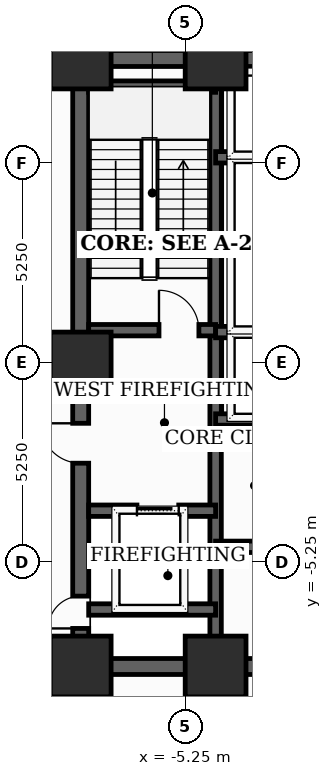
"""IFC4 building model, lengths in metres.
Left out: names, types, materials, properties, quantities, classifications, styles, units other than length and angle.
Written with IfcOpenShell. Run it as: python <this file> out.ifc"""

import sys

from ifc_helpers import new_model, si_unit, direction, frame, frame_2d, origin, origin_2d, place, context, subcontext, project, spatial, rectangle, extrude, element, fill, save


model = new_model("IFC4")
c1 = context("Model", 3, precision=1e-05, world=origin(), true_north=direction((0.0, 1.0)))
c2 = subcontext(c1, "Body", "Model", "MODEL_VIEW")
j1 = project(units=[si_unit("LENGTHUNIT", "METRE"), si_unit("PLANEANGLEUNIT", "RADIAN")], contexts=[c1])
p1 = place(None, origin())
s1 = spatial("IfcSite", under=j1, at=p1, CompositionType="ELEMENT")
p2 = place(p1, origin())
s2 = spatial("IfcBuilding", under=s1, at=p2, CompositionType="ELEMENT")
p3 = place(p2, frame((0.0, 0.0, 20.8)))
s3 = spatial("IfcBuildingStorey", under=s2, at=p3, CompositionType="ELEMENT", Elevation=20.8)
for number, where, z_axis, x_axis in (
    (1, (-8.0, -8.0, 0.0), (0.0, 0.0, 1.0), (1.0, 0.0, 0.0)),
    (2, (-4.45, -8.0, 0.0), (0.0, 0.0, 1.0), (1.0, 0.0, 0.0)),
    (3, (-4.45, 8.0, 0.0), (0.0, 0.0, 1.0), (1.0, 0.0, 0.0)),
    (4, (-8.0, 8.0, 0.0), (0.0, 0.0, 1.0), (1.0, 0.0, 0.0)),
    (5, (-8.0, 0.0, 0.0), (0.0, 0.0, 1.0), (1.0, 0.0, 0.0)),
):
    element("IfcColumn", number, at=place(p3, frame(where, z_axis=z_axis, x_axis=x_axis)), inside=s3, PredefinedType="COLUMN", context=c2, shape_type="SweptSolid", body=[
        extrude(rectangle(XDim=1.6, YDim=1.6, at=origin_2d()), origin(), (0.0, 0.0, 1.0), 5.2),
    ])
p4 = place(p3, frame((-8.0, -8.0, 0.0), z_axis=(0.0, 0.0, 1.0), x_axis=(0.0, 1.0, 0.0)))
e6 = element("IfcWall", 6, at=p4, inside=s3, PredefinedType="SHEAR", context=c2, shape_type="SweptSolid", body=[
    extrude(rectangle(XDim=16.0, YDim=0.42, at=frame_2d((8.0, 0.0))), origin(), (0.0, 0.0, 1.0), 4.94),
])
p5 = place(p4, frame((1.002, 0.0, 0.0)))
e7 = element("IfcOpeningElement", 7, at=p5, cuts=e6, PredefinedType="OPENING", context=c2, shape_type="SweptSolid", body=[
    extrude(rectangle(XDim=0.85, YDim=2.02, at=frame_2d((0.425, 1.01))), frame((0.0, 0.22, 0.0), z_axis=(0.0, -1.0, 0.0), x_axis=(1.0, 0.0, 0.0)), (0.0, 0.0, 1.0), 0.44),
])
p6 = place(p4, frame((5.35, 0.0, 0.0)))
e8 = element("IfcOpeningElement", 8, at=p6, cuts=e6, PredefinedType="OPENING", context=c2, shape_type="SweptSolid", body=[
    extrude(rectangle(XDim=1.05, YDim=2.15, at=frame_2d((0.525, 1.075))), frame((0.0, 0.22, 0.0), z_axis=(0.0, -1.0, 0.0), x_axis=(1.0, 0.0, 0.0)), (0.0, 0.0, 1.0), 0.44),
])
p7 = place(p3, frame((-8.0, -8.0, 0.0), z_axis=(0.0, 0.0, 1.0), x_axis=(1.0, 0.0, 0.0)))
e9 = element("IfcWall", 9, at=p7, inside=s3, PredefinedType="SHEAR", context=c2, shape_type="SweptSolid", body=[
    extrude(rectangle(XDim=16.0, YDim=0.42, at=frame_2d((8.0, 0.0))), origin(), (0.0, 0.0, 1.0), 4.94),
])
p8 = place(p7, frame((7.52, 0.0, 0.0)))
e10 = element("IfcOpeningElement", 10, at=p8, cuts=e9, PredefinedType="OPENING", context=c2, shape_type="SweptSolid", body=[
    extrude(rectangle(XDim=0.95, YDim=2.1, at=frame_2d((0.475, 1.05))), frame((0.0, 0.22, 0.0), z_axis=(0.0, -1.0, 0.0), x_axis=(1.0, 0.0, 0.0)), (0.0, 0.0, 1.0), 0.44),
])
p9 = place(p3, frame((-8.0, 8.0, 0.0), z_axis=(0.0, 0.0, 1.0), x_axis=(1.0, 0.0, 0.0)))
e11 = element("IfcWall", 11, at=p9, inside=s3, PredefinedType="SHEAR", context=c2, shape_type="SweptSolid", body=[
    extrude(rectangle(XDim=16.0, YDim=0.42, at=frame_2d((8.0, 0.0))), origin(), (0.0, 0.0, 1.0), 4.94),
])
p10 = place(p9, frame((7.1, 0.0, 0.0)))
e12 = element("IfcOpeningElement", 12, at=p10, cuts=e11, PredefinedType="OPENING", context=c2, shape_type="SweptSolid", body=[
    extrude(rectangle(XDim=1.8, YDim=2.15, at=frame_2d((0.9, 1.075))), frame((0.0, 0.22, 0.0), z_axis=(0.0, -1.0, 0.0), x_axis=(1.0, 0.0, 0.0)), (0.0, 0.0, 1.0), 0.44),
])
p11 = place(p3, frame((-4.45, -7.79, 0.0), z_axis=(0.0, 0.0, 1.0), x_axis=(0.0, 1.0, 0.0)))
e13 = element("IfcWall", 13, at=p11, inside=s3, PredefinedType="SHEAR", context=c2, shape_type="SweptSolid", body=[
    extrude(rectangle(XDim=15.58, YDim=0.3, at=frame_2d((7.79, 0.0))), origin(), (0.0, 0.0, 1.0), 4.94),
])
p12 = place(p3, frame((-7.79, 0.85, 0.0), z_axis=(0.0, 0.0, 1.0), x_axis=(1.0, 0.0, 0.0)))
e14 = element("IfcWall", 14, at=p12, inside=s3, PredefinedType="SHEAR", context=c2, shape_type="SweptSolid", body=[
    extrude(rectangle(XDim=3.34, YDim=0.3, at=frame_2d((1.67, 0.0))), origin(), (0.0, 0.0, 1.0), 4.94),
])
p13 = place(p12, frame((1.85, 0.0, 0.0)))
e15 = element("IfcOpeningElement", 15, at=p13, cuts=e14, PredefinedType="OPENING", context=c2, shape_type="SweptSolid", body=[
    extrude(rectangle(XDim=1.05, YDim=2.15, at=frame_2d((0.525, 1.075))), frame((0.0, 0.16, 0.0), z_axis=(0.0, -1.0, 0.0), x_axis=(1.0, 0.0, 0.0)), (0.0, 0.0, 1.0), 0.32),
])
p14 = place(p3, frame((-7.79, 7.26, 0.0), z_axis=(0.0, 0.0, 1.0), x_axis=(1.0, 0.0, 0.0)))
e16 = element("IfcWall", 16, at=p14, inside=s3, PredefinedType="SHEAR", context=c2, shape_type="SweptSolid", body=[
    extrude(rectangle(XDim=3.34, YDim=0.3, at=frame_2d((1.67, 0.0))), origin(), (0.0, 0.0, 1.0), 4.94),
])
p15 = place(p3, frame((-7.79, -3.9, 0.0), z_axis=(0.0, 0.0, 1.0), x_axis=(1.0, 0.0, 0.0)))
e17 = element("IfcWall", 17, at=p15, inside=s3, PredefinedType="SHEAR", context=c2, shape_type="SweptSolid", body=[
    extrude(rectangle(XDim=3.34, YDim=0.3, at=frame_2d((1.67, 0.0))), origin(), (0.0, 0.0, 1.0), 4.94),
])
p16 = place(p15, frame((1.27, 0.0, 0.0)))
e18 = element("IfcOpeningElement", 18, at=p16, cuts=e17, PredefinedType="OPENING", context=c2, shape_type="SweptSolid", body=[
    extrude(rectangle(XDim=1.1, YDim=2.1, at=frame_2d((0.55, 1.05))), frame((0.0, 0.16, 0.0), z_axis=(0.0, -1.0, 0.0), x_axis=(1.0, 0.0, 0.0)), (0.0, 0.0, 1.0), 0.32),
])
p17 = place(p3, frame((-7.79, -6.5, 0.0), z_axis=(0.0, 0.0, 1.0), x_axis=(1.0, 0.0, 0.0)))
e19 = element("IfcWall", 19, at=p17, inside=s3, PredefinedType="SHEAR", context=c2, shape_type="SweptSolid", body=[
    extrude(rectangle(XDim=3.34, YDim=0.3, at=frame_2d((1.67, 0.0))), origin(), (0.0, 0.0, 1.0), 4.94),
])
p18 = place(p3, frame((-4.45, -4.85, 0.0), z_axis=(0.0, 0.0, 1.0), x_axis=(1.0, 0.0, 0.0)))
e20 = element("IfcWall", 20, at=p18, inside=s3, PredefinedType="SHEAR", context=c2, shape_type="SweptSolid", body=[
    extrude(rectangle(XDim=8.9, YDim=0.3, at=frame_2d((4.45, 0.0))), origin(), (0.0, 0.0, 1.0), 4.94),
])
for number, where, z_axis, x_axis in (
    (21, (-4.45, -1.5, 0.0), (0.0, 0.0, 1.0), (1.0, 0.0, 0.0)),
    (22, (-4.45, 0.8, 0.0), (0.0, 0.0, 1.0), (1.0, 0.0, 0.0)),
    (23, (-4.45, 3.1, 0.0), (0.0, 0.0, 1.0), (1.0, 0.0, 0.0)),
    (24, (-4.45, 5.4, 0.0), (0.0, 0.0, 1.0), (1.0, 0.0, 0.0)),
):
    element("IfcWall", number, at=place(p3, frame(where, z_axis=z_axis, x_axis=x_axis)), inside=s3, PredefinedType="SHEAR", context=c2, shape_type="SweptSolid", body=[
        extrude(rectangle(XDim=2.77, YDim=0.3, at=frame_2d((1.385, 0.0))), origin(), (0.0, 0.0, 1.0), 4.94),
    ])
p19 = place(p5, origin())
e25 = element("IfcDoor", 25, at=p19, inside=s3, OperationType="SINGLE_SWING_LEFT", PredefinedType="TRAPDOOR", context=c2, shape_type="SweptSolid", body=[
    extrude(rectangle(XDim=0.85, YDim=2.02, at=frame_2d((0.425, 1.01))), frame((0.0, 0.025, 0.0), z_axis=(0.0, -1.0, 0.0), x_axis=(1.0, 0.0, 0.0)), (0.0, 0.0, 1.0), 0.05),
])
fill(e7, e25)
p20 = place(p6, origin())
e26 = element("IfcDoor", 26, at=p20, inside=s3, OperationType="SINGLE_SWING_RIGHT", PredefinedType="DOOR", context=c2, shape_type="SweptSolid", body=[
    extrude(rectangle(XDim=1.05, YDim=2.15, at=frame_2d((0.525, 1.075))), frame((0.0, 0.025, 0.0), z_axis=(0.0, -1.0, 0.0), x_axis=(1.0, 0.0, 0.0)), (0.0, 0.0, 1.0), 0.05),
])
fill(e8, e26)
p21 = place(p13, origin())
e27 = element("IfcDoor", 27, at=p21, inside=s3, OperationType="SINGLE_SWING_LEFT", PredefinedType="DOOR", context=c2, shape_type="SweptSolid", body=[
    extrude(rectangle(XDim=1.05, YDim=2.15, at=frame_2d((0.525, 1.075))), frame((0.0, 0.025, 0.0), z_axis=(0.0, -1.0, 0.0), x_axis=(1.0, 0.0, 0.0)), (0.0, 0.0, 1.0), 0.05),
])
fill(e15, e27)
p22 = place(p16, origin())
e28 = element("IfcDoor", 28, at=p22, inside=s3, OperationType="SLIDING_TO_LEFT", PredefinedType="DOOR", context=c2, shape_type="SweptSolid", body=[
    extrude(rectangle(XDim=1.1, YDim=2.1, at=frame_2d((0.55, 1.05))), frame((0.0, 0.025, 0.0), z_axis=(0.0, -1.0, 0.0), x_axis=(1.0, 0.0, 0.0)), (0.0, 0.0, 1.0), 0.05),
])
fill(e18, e28)
save(model, sys.argv[1])
